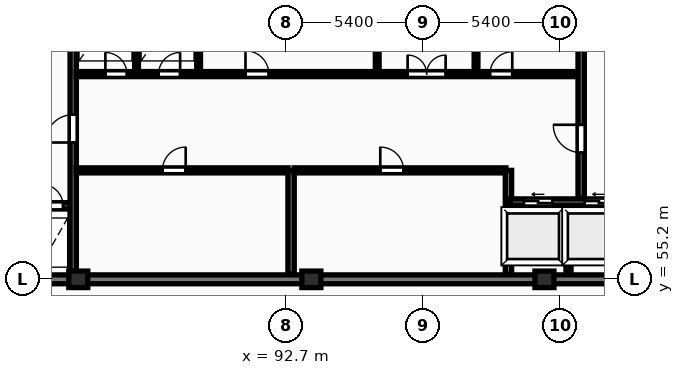
"""IFC4 building model, lengths in metres.
Left out: names, types, materials, properties, quantities, classifications, styles, units other than length and angle.
Written with IfcOpenShell. Run it as: python <this file> out.ifc"""

import sys

from ifc_helpers import new_model, si_unit, direction, frame, frame_2d, origin, origin_2d, place, context, subcontext, project, spatial, rectangle, extrude, element, fill, save


model = new_model("IFC4")
c1 = context("Model", 3, precision=1e-05, world=origin(), true_north=direction((0.0, 1.0)))
c2 = subcontext(c1, "Body", "Model", "MODEL_VIEW")
j1 = project(units=[si_unit("LENGTHUNIT", "METRE"), si_unit("PLANEANGLEUNIT", "RADIAN")], contexts=[c1])
p1 = place(None, origin())
s1 = spatial("IfcSite", under=j1, at=p1, CompositionType="ELEMENT")
p2 = place(p1, origin())
s2 = spatial("IfcBuilding", under=s1, at=p2, CompositionType="ELEMENT")
p3 = place(p2, frame((0.0, 0.0, 235.55)))
s3 = spatial("IfcBuildingStorey", under=s2, at=p3, CompositionType="ELEMENT", Elevation=235.55)
for number, where, z_axis, x_axis in (
    (1, (84.5, 55.2, 0.0), (0.0, 0.0, 1.0), (1.0, 0.0, 0.0)),
    (2, (93.7, 55.2, 0.0), (0.0, 0.0, 1.0), (1.0, 0.0, 0.0)),
    (3, (102.9, 55.2, 0.0), (0.0, 0.0, 1.0), (1.0, 0.0, 0.0)),
):
    element("IfcColumn", number, at=place(p3, frame(where, z_axis=z_axis, x_axis=x_axis)), inside=s3, PredefinedType="COLUMN", context=c2, shape_type="SweptSolid", body=[
        extrude(rectangle(XDim=0.75, YDim=0.65, at=origin_2d()), origin(), (0.0, 0.0, 1.0), 3.45),
    ])
p4 = place(p3, frame((75.95, 55.2, 0.0), z_axis=(0.0, 0.0, 1.0), x_axis=(1.0, 0.0, 0.0)))
e4 = element("IfcWall", 4, at=p4, inside=s3, PredefinedType="SHEAR", context=c2, shape_type="SweptSolid", body=[
    extrude(rectangle(XDim=36.3, YDim=0.35, at=frame_2d((18.15, 0.0))), origin(), (0.0, 0.0, 1.0), 3.45),
])
p5 = place(p3, frame((79.79, 58.1, 0.0), z_axis=(0.0, 0.0, 1.0), x_axis=(1.0, 0.0, 0.0)))
e5 = element("IfcWall", 5, at=p5, inside=s3, PredefinedType="SHEAR", context=c2, shape_type="SweptSolid", body=[
    extrude(rectangle(XDim=4.39, YDim=0.25, at=frame_2d((2.195, 0.0))), origin(), (0.0, 0.0, 1.0), 3.45),
])
p6 = place(p5, frame((1.05, 0.0, 0.0)))
e6 = element("IfcOpeningElement", 6, at=p6, cuts=e5, PredefinedType="OPENING", context=c2, shape_type="SweptSolid", body=[
    extrude(rectangle(XDim=1.12, YDim=2.12, at=frame_2d((0.56, 1.06))), frame((0.0, 0.135, 0.0), z_axis=(0.0, -1.0, 0.0), x_axis=(1.0, 0.0, 0.0)), (0.0, 0.0, 1.0), 0.27),
])
p7 = place(p5, frame((3.26, 0.0, 0.0)))
e7 = element("IfcOpeningElement", 7, at=p7, cuts=e5, PredefinedType="OPENING", context=c2, shape_type="SweptSolid", body=[
    extrude(rectangle(XDim=0.85, YDim=2.05, at=frame_2d((0.425, 1.025))), frame((0.0, 0.135, 0.0), z_axis=(0.0, -1.0, 0.0), x_axis=(1.0, 0.0, 0.0)), (0.0, 0.0, 1.0), 0.27),
])
p8 = place(p3, frame((84.3, 55.4, 0.0), z_axis=(0.0, 0.0, 1.0), x_axis=(0.0, 1.0, 0.0)))
e8 = element("IfcWall", 8, at=p8, inside=s3, PredefinedType="SHEAR", context=c2, shape_type="SweptSolid", body=[
    extrude(rectangle(XDim=11.6, YDim=0.25, at=frame_2d((5.8, 0.0))), origin(), (0.0, 0.0, 1.0), 3.45),
])
p9 = place(p8, frame((5.2, 0.0, 0.0)))
e9 = element("IfcOpeningElement", 9, at=p9, cuts=e8, PredefinedType="OPENING", context=c2, shape_type="SweptSolid", body=[
    extrude(rectangle(XDim=1.1, YDim=2.1, at=frame_2d((0.55, 1.05))), frame((0.0, 0.135, 0.0), z_axis=(0.0, -1.0, 0.0), x_axis=(1.0, 0.0, 0.0)), (0.0, 0.0, 1.0), 0.27),
])
p10 = place(p3, frame((84.42, 59.5, 0.0), z_axis=(0.0, 0.0, 1.0), x_axis=(1.0, 0.0, 0.0)))
e10 = element("IfcWall", 10, at=p10, inside=s3, PredefinedType="PARTITIONING", context=c2, shape_type="SweptSolid", body=[
    extrude(rectangle(XDim=8.36, YDim=0.2, at=frame_2d((4.18, 0.0))), origin(), (0.0, 0.0, 1.0), 3.17),
])
p11 = place(p10, frame((3.4, 0.0, 0.0)))
e11 = element("IfcOpeningElement", 11, at=p11, cuts=e10, PredefinedType="OPENING", context=c2, shape_type="SweptSolid", body=[
    extrude(rectangle(XDim=0.92, YDim=2.08, at=frame_2d((0.46, 1.04))), frame((0.0, 0.11, 0.0), z_axis=(0.0, -1.0, 0.0), x_axis=(1.0, 0.0, 0.0)), (0.0, 0.0, 1.0), 0.22),
])
p12 = place(p3, frame((92.9, 55.4, 0.0), z_axis=(0.0, 0.0, 1.0), x_axis=(0.0, 1.0, 0.0)))
e12 = element("IfcWall", 12, at=p12, inside=s3, PredefinedType="SHEAR", context=c2, shape_type="SweptSolid", body=[
    extrude(rectangle(XDim=4.1, YDim=0.25, at=frame_2d((2.05, 0.0))), origin(), (0.0, 0.0, 1.0), 3.45),
])
p13 = place(p3, frame((93.02, 59.5, 0.0), z_axis=(0.0, 0.0, 1.0), x_axis=(1.0, 0.0, 0.0)))
e13 = element("IfcWall", 13, at=p13, inside=s3, PredefinedType="PARTITIONING", context=c2, shape_type="SweptSolid", body=[
    extrude(rectangle(XDim=8.36, YDim=0.2, at=frame_2d((4.18, 0.0))), origin(), (0.0, 0.0, 1.0), 3.17),
])
p14 = place(p13, frame((3.4, 0.0, 0.0)))
e14 = element("IfcOpeningElement", 14, at=p14, cuts=e13, PredefinedType="OPENING", context=c2, shape_type="SweptSolid", body=[
    extrude(rectangle(XDim=0.92, YDim=2.08, at=frame_2d((0.46, 1.04))), frame((0.0, 0.11, 0.0), z_axis=(0.0, -1.0, 0.0), x_axis=(1.0, 0.0, 0.0)), (0.0, 0.0, 1.0), 0.22),
])
p15 = place(p3, frame((101.48, 55.4, 0.0), z_axis=(0.0, 0.0, 1.0), x_axis=(0.0, 1.0, 0.0)))
e15 = element("IfcWall", 15, at=p15, inside=s3, PredefinedType="SHEAR", context=c2, shape_type="SweptSolid", body=[
    extrude(rectangle(XDim=4.1, YDim=0.25, at=frame_2d((2.05, 0.0))), origin(), (0.0, 0.0, 1.0), 3.45),
])
p16 = place(p3, frame((103.85, 55.4, 0.0), z_axis=(0.0, 0.0, 1.0), x_axis=(0.0, 1.0, 0.0)))
e16 = element("IfcWall", 16, at=p16, inside=s3, PredefinedType="PARTITIONING", context=c2, shape_type="SweptSolid", body=[
    extrude(rectangle(XDim=2.72, YDim=0.2, at=frame_2d((1.36, 0.0))), origin(), (0.0, 0.0, 1.0), 3.17),
])
p17 = place(p3, frame((101.55, 58.25, 0.0), z_axis=(0.0, 0.0, 1.0), x_axis=(1.0, 0.0, 0.0)))
e17 = element("IfcWall", 17, at=p17, inside=s3, PredefinedType="SHEAR", context=c2, shape_type="SweptSolid", body=[
    extrude(rectangle(XDim=4.6, YDim=0.25, at=frame_2d((2.3, 0.0))), origin(), (0.0, 0.0, 1.0), 3.45),
])
p18 = place(p17, frame((0.54, 0.0, 0.0)))
e18 = element("IfcOpeningElement", 18, at=p18, cuts=e17, PredefinedType="OPENING", context=c2, shape_type="SweptSolid", body=[
    extrude(rectangle(XDim=1.12, YDim=2.12, at=frame_2d((0.56, 1.06))), frame((0.0, 0.135, 0.0), z_axis=(0.0, -1.0, 0.0), x_axis=(1.0, 0.0, 0.0)), (0.0, 0.0, 1.0), 0.27),
])
p19 = place(p17, frame((2.94, 0.0, 0.0)))
e19 = element("IfcOpeningElement", 19, at=p19, cuts=e17, PredefinedType="OPENING", context=c2, shape_type="SweptSolid", body=[
    extrude(rectangle(XDim=1.12, YDim=2.12, at=frame_2d((0.56, 1.06))), frame((0.0, 0.135, 0.0), z_axis=(0.0, -1.0, 0.0), x_axis=(1.0, 0.0, 0.0)), (0.0, 0.0, 1.0), 0.27),
])
for number, where, z_axis, x_axis in (
    (20, (86.8, 63.4, 0.0), (0.0, 0.0, 1.0), (0.0, 1.0, 0.0)),
    (21, (89.25, 63.4, 0.0), (0.0, 0.0, 1.0), (0.0, 1.0, 0.0)),
    (22, (96.3, 63.4, 0.0), (0.0, 0.0, 1.0), (0.0, 1.0, 0.0)),
    (23, (100.2, 63.4, 0.0), (0.0, 0.0, 1.0), (0.0, 1.0, 0.0)),
):
    element("IfcWall", number, at=place(p3, frame(where, z_axis=z_axis, x_axis=x_axis)), inside=s3, PredefinedType="PARTITIONING", context=c2, shape_type="SweptSolid", body=[
        extrude(rectangle(XDim=3.6, YDim=0.15, at=frame_2d((1.8, 0.0))), origin(), (0.0, 0.0, 1.0), 3.17),
    ])
p20 = place(p3, frame((84.42, 63.3, 0.0), z_axis=(0.0, 0.0, 1.0), x_axis=(1.0, 0.0, 0.0)))
e24 = element("IfcWall", 24, at=p20, inside=s3, PredefinedType="PARTITIONING", context=c2, shape_type="SweptSolid", body=[
    extrude(rectangle(XDim=19.83, YDim=0.2, at=frame_2d((9.915, 0.0))), origin(), (0.0, 0.0, 1.0), 3.17),
])
p21 = place(p20, frame((1.15, 0.0, 0.0)))
e25 = element("IfcOpeningElement", 25, at=p21, cuts=e24, PredefinedType="OPENING", context=c2, shape_type="SweptSolid", body=[
    extrude(rectangle(XDim=0.85, YDim=2.05, at=frame_2d((0.425, 1.025))), frame((0.0, 0.11, 0.0), z_axis=(0.0, -1.0, 0.0), x_axis=(1.0, 0.0, 0.0)), (0.0, 0.0, 1.0), 0.22),
])
p22 = place(p20, frame((3.25, 0.0, 0.0)))
e26 = element("IfcOpeningElement", 26, at=p22, cuts=e24, PredefinedType="OPENING", context=c2, shape_type="SweptSolid", body=[
    extrude(rectangle(XDim=0.85, YDim=2.05, at=frame_2d((0.425, 1.025))), frame((0.0, 0.11, 0.0), z_axis=(0.0, -1.0, 0.0), x_axis=(1.0, 0.0, 0.0)), (0.0, 0.0, 1.0), 0.22),
])
p23 = place(p20, frame((13.08, 0.0, 0.0)))
e27 = element("IfcOpeningElement", 27, at=p23, cuts=e24, PredefinedType="OPENING", context=c2, shape_type="SweptSolid", body=[
    extrude(rectangle(XDim=1.5, YDim=2.2, at=frame_2d((0.75, 1.1))), frame((0.0, 0.11, 0.0), z_axis=(0.0, -1.0, 0.0), x_axis=(1.0, 0.0, 0.0)), (0.0, 0.0, 1.0), 0.22),
])
p24 = place(p20, frame((6.68, 0.0, 0.0)))
e28 = element("IfcOpeningElement", 28, at=p24, cuts=e24, PredefinedType="OPENING", context=c2, shape_type="SweptSolid", body=[
    extrude(rectangle(XDim=0.92, YDim=2.08, at=frame_2d((0.46, 1.04))), frame((0.0, 0.11, 0.0), z_axis=(0.0, -1.0, 0.0), x_axis=(1.0, 0.0, 0.0)), (0.0, 0.0, 1.0), 0.22),
])
p25 = place(p20, frame((16.33, 0.0, 0.0)))
e29 = element("IfcOpeningElement", 29, at=p25, cuts=e24, PredefinedType="OPENING", context=c2, shape_type="SweptSolid", body=[
    extrude(rectangle(XDim=0.88, YDim=2.06, at=frame_2d((0.44, 1.03))), frame((0.0, 0.11, 0.0), z_axis=(0.0, -1.0, 0.0), x_axis=(1.0, 0.0, 0.0)), (0.0, 0.0, 1.0), 0.22),
])
p26 = place(p3, frame((104.35, 58.4, 0.0), z_axis=(0.0, 0.0, 1.0), x_axis=(0.0, 1.0, 0.0)))
e30 = element("IfcWall", 30, at=p26, inside=s3, PredefinedType="SHEAR", context=c2, shape_type="SweptSolid", body=[
    extrude(rectangle(XDim=8.6, YDim=0.25, at=frame_2d((4.3, 0.0))), origin(), (0.0, 0.0, 1.0), 3.45),
])
p27 = place(p26, frame((1.8, 0.0, 0.0)))
e31 = element("IfcOpeningElement", 31, at=p27, cuts=e30, PredefinedType="OPENING", context=c2, shape_type="SweptSolid", body=[
    extrude(rectangle(XDim=1.1, YDim=2.1, at=frame_2d((0.55, 1.05))), frame((0.0, 0.135, 0.0), z_axis=(0.0, -1.0, 0.0), x_axis=(1.0, 0.0, 0.0)), (0.0, 0.0, 1.0), 0.27),
])
p28 = place(p7, origin())
e32 = element("IfcDoor", 32, at=p28, inside=s3, OperationType="SINGLE_SWING_LEFT", PredefinedType="DOOR", context=c2, shape_type="SweptSolid", body=[
    extrude(rectangle(XDim=0.85, YDim=2.05, at=frame_2d((0.425, 1.025))), frame((0.0, 0.025, 0.0), z_axis=(0.0, -1.0, 0.0), x_axis=(1.0, 0.0, 0.0)), (0.0, 0.0, 1.0), 0.05),
])
fill(e7, e32)
p29 = place(p9, origin())
e33 = element("IfcDoor", 33, at=p29, inside=s3, OperationType="SINGLE_SWING_LEFT", PredefinedType="DOOR", context=c2, shape_type="SweptSolid", body=[
    extrude(rectangle(XDim=1.1, YDim=2.1, at=frame_2d((0.55, 1.05))), frame((0.0, 0.025, 0.0), z_axis=(0.0, -1.0, 0.0), x_axis=(1.0, 0.0, 0.0)), (0.0, 0.0, 1.0), 0.05),
])
fill(e9, e33)
p30 = place(p11, origin())
e34 = element("IfcDoor", 34, at=p30, inside=s3, OperationType="SINGLE_SWING_RIGHT", PredefinedType="DOOR", context=c2, shape_type="SweptSolid", body=[
    extrude(rectangle(XDim=0.92, YDim=2.08, at=frame_2d((0.46, 1.04))), frame((0.0, 0.025, 0.0), z_axis=(0.0, -1.0, 0.0), x_axis=(1.0, 0.0, 0.0)), (0.0, 0.0, 1.0), 0.05),
])
fill(e11, e34)
p31 = place(p14, origin())
e35 = element("IfcDoor", 35, at=p31, inside=s3, OperationType="SINGLE_SWING_LEFT", PredefinedType="DOOR", context=c2, shape_type="SweptSolid", body=[
    extrude(rectangle(XDim=0.92, YDim=2.08, at=frame_2d((0.46, 1.04))), frame((0.0, 0.025, 0.0), z_axis=(0.0, -1.0, 0.0), x_axis=(1.0, 0.0, 0.0)), (0.0, 0.0, 1.0), 0.05),
])
fill(e14, e35)
p32 = place(p18, origin())
e36 = element("IfcDoor", 36, at=p32, inside=s3, OperationType="SLIDING_TO_LEFT", PredefinedType="DOOR", context=c2, shape_type="SweptSolid", body=[
    extrude(rectangle(XDim=1.12, YDim=2.12, at=frame_2d((0.56, 1.06))), frame((0.0, 0.025, 0.0), z_axis=(0.0, -1.0, 0.0), x_axis=(1.0, 0.0, 0.0)), (0.0, 0.0, 1.0), 0.05),
])
fill(e18, e36)
p33 = place(p19, origin())
e37 = element("IfcDoor", 37, at=p33, inside=s3, OperationType="SLIDING_TO_LEFT", PredefinedType="DOOR", context=c2, shape_type="SweptSolid", body=[
    extrude(rectangle(XDim=1.12, YDim=2.12, at=frame_2d((0.56, 1.06))), frame((0.0, 0.025, 0.0), z_axis=(0.0, -1.0, 0.0), x_axis=(1.0, 0.0, 0.0)), (0.0, 0.0, 1.0), 0.05),
])
fill(e19, e37)
p34 = place(p21, origin())
e38 = element("IfcDoor", 38, at=p34, inside=s3, OperationType="SINGLE_SWING_LEFT", PredefinedType="DOOR", context=c2, shape_type="SweptSolid", body=[
    extrude(rectangle(XDim=0.85, YDim=2.05, at=frame_2d((0.425, 1.025))), frame((0.0, 0.025, 0.0), z_axis=(0.0, -1.0, 0.0), x_axis=(1.0, 0.0, 0.0)), (0.0, 0.0, 1.0), 0.05),
])
fill(e25, e38)
p35 = place(p22, origin())
e39 = element("IfcDoor", 39, at=p35, inside=s3, OperationType="SINGLE_SWING_RIGHT", PredefinedType="DOOR", context=c2, shape_type="SweptSolid", body=[
    extrude(rectangle(XDim=0.85, YDim=2.05, at=frame_2d((0.425, 1.025))), frame((0.0, 0.025, 0.0), z_axis=(0.0, -1.0, 0.0), x_axis=(1.0, 0.0, 0.0)), (0.0, 0.0, 1.0), 0.05),
])
fill(e26, e39)
p36 = place(p23, origin())
e40 = element("IfcDoor", 40, at=p36, inside=s3, OperationType="DOUBLE_DOOR_SINGLE_SWING", PredefinedType="DOOR", context=c2, shape_type="SweptSolid", body=[
    extrude(rectangle(XDim=1.5, YDim=2.2, at=frame_2d((0.75, 1.1))), frame((0.0, 0.025, 0.0), z_axis=(0.0, -1.0, 0.0), x_axis=(1.0, 0.0, 0.0)), (0.0, 0.0, 1.0), 0.05),
])
fill(e27, e40)
p37 = place(p24, origin())
e41 = element("IfcDoor", 41, at=p37, inside=s3, OperationType="SINGLE_SWING_LEFT", PredefinedType="DOOR", context=c2, shape_type="SweptSolid", body=[
    extrude(rectangle(XDim=0.92, YDim=2.08, at=frame_2d((0.46, 1.04))), frame((0.0, 0.025, 0.0), z_axis=(0.0, -1.0, 0.0), x_axis=(1.0, 0.0, 0.0)), (0.0, 0.0, 1.0), 0.05),
])
fill(e28, e41)
p38 = place(p25, origin())
e42 = element("IfcDoor", 42, at=p38, inside=s3, OperationType="SINGLE_SWING_RIGHT", PredefinedType="DOOR", context=c2, shape_type="SweptSolid", body=[
    extrude(rectangle(XDim=0.88, YDim=2.06, at=frame_2d((0.44, 1.03))), frame((0.0, 0.025, 0.0), z_axis=(0.0, -1.0, 0.0), x_axis=(1.0, 0.0, 0.0)), (0.0, 0.0, 1.0), 0.05),
])
fill(e29, e42)
p39 = place(p27, origin())
e43 = element("IfcDoor", 43, at=p39, inside=s3, OperationType="SINGLE_SWING_RIGHT", PredefinedType="DOOR", context=c2, shape_type="SweptSolid", body=[
    extrude(rectangle(XDim=1.1, YDim=2.1, at=frame_2d((0.55, 1.05))), frame((0.0, 0.025, 0.0), z_axis=(0.0, -1.0, 0.0), x_axis=(1.0, 0.0, 0.0)), (0.0, 0.0, 1.0), 0.05),
])
fill(e31, e43)
save(model, sys.argv[1])
